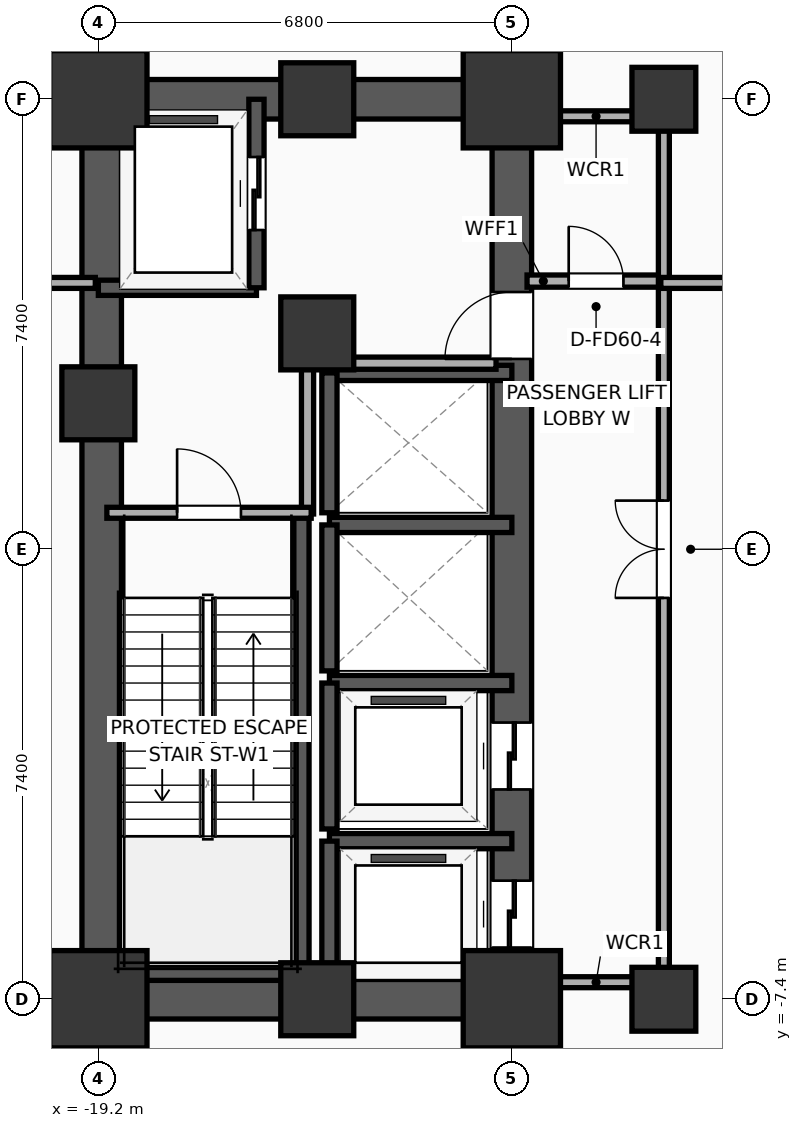
"""IFC4 building model, lengths in metres.
Left out: names, types, materials, properties, quantities, classifications, styles, units other than length and angle.
Written with IfcOpenShell. Run it as: python <this file> out.ifc"""

import sys

from ifc_helpers import new_model, si_unit, direction, frame, frame_2d, origin, origin_2d, place, context, subcontext, project, spatial, rectangle, extrude, element, fill, save


model = new_model("IFC4")
c1 = context("Model", 3, precision=1e-05, world=origin(), true_north=direction((0.0, 1.0)))
c2 = subcontext(c1, "Body", "Model", "MODEL_VIEW")
j1 = project(units=[si_unit("LENGTHUNIT", "METRE"), si_unit("PLANEANGLEUNIT", "RADIAN")], contexts=[c1])
p1 = place(None, origin())
s1 = spatial("IfcSite", under=j1, at=p1, CompositionType="ELEMENT")
p2 = place(p1, origin())
s2 = spatial("IfcBuilding", under=s1, at=p2, CompositionType="ELEMENT")
p3 = place(p2, frame((0.0, 0.0, 20.8)))
s3 = spatial("IfcBuildingStorey", under=s2, at=p3, CompositionType="ELEMENT", Elevation=20.8)
p4 = place(p3, frame((-19.2, -7.4, 0.0), z_axis=(0.0, 0.0, 1.0), x_axis=(1.0, 0.0, 0.0)))
e1 = element("IfcColumn", 1, at=p4, inside=s3, PredefinedType="COLUMN", context=c2, shape_type="SweptSolid", body=[
    extrude(rectangle(XDim=1.6, YDim=1.6, at=origin_2d()), origin(), (0.0, 0.0, 1.0), 5.2),
])
p5 = place(p3, frame((-19.2, 2.4, 0.0), z_axis=(0.0, 0.0, 1.0), x_axis=(1.0, 0.0, 0.0)))
e2 = element("IfcColumn", 2, at=p5, inside=s3, PredefinedType="COLUMN", context=c2, shape_type="SweptSolid", body=[
    extrude(rectangle(XDim=1.2, YDim=1.2, at=origin_2d()), origin(), (0.0, 0.0, 1.0), 5.2),
])
p6 = place(p3, frame((-19.2, 7.4, 0.0), z_axis=(0.0, 0.0, 1.0), x_axis=(1.0, 0.0, 0.0)))
e3 = element("IfcColumn", 3, at=p6, inside=s3, PredefinedType="COLUMN", context=c2, shape_type="SweptSolid", body=[
    extrude(rectangle(XDim=1.6, YDim=1.6, at=origin_2d()), origin(), (0.0, 0.0, 1.0), 5.2),
])
for number, where, z_axis, x_axis in (
    (4, (-15.6, -7.4, 0.0), (0.0, 0.0, 1.0), (1.0, 0.0, 0.0)),
    (5, (-15.6, 7.4, 0.0), (0.0, 0.0, 1.0), (1.0, 0.0, 0.0)),
):
    element("IfcColumn", number, at=place(p3, frame(where, z_axis=z_axis, x_axis=x_axis)), inside=s3, PredefinedType="COLUMN", context=c2, shape_type="SweptSolid", body=[
        extrude(rectangle(XDim=1.2, YDim=1.2, at=origin_2d()), origin(), (0.0, 0.0, 1.0), 5.2),
    ])
p7 = place(p3, frame((-12.4, -7.4, 0.0), z_axis=(0.0, 0.0, 1.0), x_axis=(1.0, 0.0, 0.0)))
e6 = element("IfcColumn", 6, at=p7, inside=s3, PredefinedType="COLUMN", context=c2, shape_type="SweptSolid", body=[
    extrude(rectangle(XDim=1.6, YDim=1.6, at=origin_2d()), origin(), (0.0, 0.0, 1.0), 5.2),
])
p8 = place(p3, frame((-15.6, 3.55, 0.0), z_axis=(0.0, 0.0, 1.0), x_axis=(1.0, 0.0, 0.0)))
e7 = element("IfcColumn", 7, at=p8, inside=s3, PredefinedType="COLUMN", context=c2, shape_type="SweptSolid", body=[
    extrude(rectangle(XDim=1.2, YDim=1.2, at=origin_2d()), origin(), (0.0, 0.0, 1.0), 5.2),
])
p9 = place(p3, frame((-12.4, 7.4, 0.0), z_axis=(0.0, 0.0, 1.0), x_axis=(1.0, 0.0, 0.0)))
e8 = element("IfcColumn", 8, at=p9, inside=s3, PredefinedType="COLUMN", context=c2, shape_type="SweptSolid", body=[
    extrude(rectangle(XDim=1.6, YDim=1.6, at=origin_2d()), origin(), (0.0, 0.0, 1.0), 5.2),
])
for number, where, z_axis, x_axis in (
    (9, (-19.525, -7.4, 0.0), (0.0, 0.0, 1.0), (1.0, 0.0, 0.0)),
    (10, (-19.525, 7.4, 0.0), (0.0, 0.0, 1.0), (1.0, 0.0, 0.0)),
):
    element("IfcWall", number, at=place(p3, frame(where, z_axis=z_axis, x_axis=x_axis)), inside=s3, PredefinedType="SHEAR", context=c2, shape_type="SweptSolid", body=[
        extrude(rectangle(XDim=7.45, YDim=0.65, at=frame_2d((3.725, 0.0))), origin(), (0.0, 0.0, 1.0), 4.95),
    ])
p10 = place(p3, frame((-19.145, -7.4, 0.0), z_axis=(0.0, 0.0, 1.0), x_axis=(0.0, 1.0, 0.0)))
e11 = element("IfcWall", 11, at=p10, inside=s3, PredefinedType="SHEAR", context=c2, shape_type="SweptSolid", body=[
    extrude(rectangle(XDim=14.8, YDim=0.65, at=frame_2d((7.4, 0.0))), origin(), (0.0, 0.0, 1.0), 4.95),
])
p11 = place(p3, frame((-12.4, -7.4, 0.0), z_axis=(0.0, 0.0, 1.0), x_axis=(0.0, 1.0, 0.0)))
e12 = element("IfcWall", 12, at=p11, inside=s3, PredefinedType="SHEAR", context=c2, shape_type="SweptSolid", body=[
    extrude(rectangle(XDim=14.8, YDim=0.65, at=frame_2d((7.4, 0.0))), origin(), (0.0, 0.0, 1.0), 4.95),
])
p12 = place(p11, frame((0.85, 0.0, 0.0)))
e13 = element("IfcOpeningElement", 13, at=p12, cuts=e12, PredefinedType="OPENING", context=c2, shape_type="SweptSolid", body=[
    extrude(rectangle(XDim=1.1, YDim=2.05, at=frame_2d((0.55, 1.025))), frame((0.0, 0.335, 0.0), z_axis=(0.0, -1.0, 0.0), x_axis=(1.0, 0.0, 0.0)), (0.0, 0.0, 1.0), 0.67),
])
p13 = place(p11, frame((3.45, 0.0, 0.0)))
e14 = element("IfcOpeningElement", 14, at=p13, cuts=e12, PredefinedType="OPENING", context=c2, shape_type="SweptSolid", body=[
    extrude(rectangle(XDim=1.1, YDim=2.05, at=frame_2d((0.55, 1.025))), frame((0.0, 0.335, 0.0), z_axis=(0.0, -1.0, 0.0), x_axis=(1.0, 0.0, 0.0)), (0.0, 0.0, 1.0), 0.67),
])
p14 = place(p11, frame((10.53, 0.0, 0.0)))
e15 = element("IfcOpeningElement", 15, at=p14, cuts=e12, PredefinedType="OPENING", context=c2, shape_type="SweptSolid", body=[
    extrude(rectangle(XDim=1.1, YDim=2.05, at=frame_2d((0.55, 1.025))), frame((0.0, 0.335, 0.0), z_axis=(0.0, -1.0, 0.0), x_axis=(1.0, 0.0, 0.0)), (0.0, 0.0, 1.0), 0.67),
])
p15 = place(p3, frame((-15.86, -7.085, 0.0), z_axis=(0.0, 0.0, 1.0), x_axis=(0.0, 1.0, 0.0)))
e16 = element("IfcWall", 16, at=p15, inside=s3, PredefinedType="SOLIDWALL", context=c2, shape_type="SweptSolid", body=[
    extrude(rectangle(XDim=7.685, YDim=0.25, at=frame_2d((3.843, 0.0))), origin(), (0.0, 0.0, 1.0), 4.95),
])
p16 = place(p3, frame((-19.2, -6.965, 0.0), z_axis=(0.0, 0.0, 1.0), x_axis=(1.0, 0.0, 0.0)))
e17 = element("IfcWall", 17, at=p16, inside=s3, PredefinedType="SOLIDWALL", context=c2, shape_type="SweptSolid", body=[
    extrude(rectangle(XDim=3.46, YDim=0.25, at=frame_2d((1.73, 0.0))), origin(), (0.0, 0.0, 1.0), 4.95),
])
for number, where, z_axis, x_axis in (
    (18, (-9.9, -7.4, 0.0), (0.0, 0.0, 1.0), (1.0, 0.0, 0.0)),
    (19, (-9.9, 7.4, 0.0), (0.0, 0.0, 1.0), (1.0, 0.0, 0.0)),
):
    element("IfcColumn", number, at=place(p3, frame(where, z_axis=z_axis, x_axis=x_axis)), inside=s3, PredefinedType="COLUMN", context=c2, shape_type="SweptSolid", body=[
        extrude(rectangle(XDim=1.05, YDim=1.05, at=origin_2d()), origin(), (0.0, 0.0, 1.0), 5.2),
    ])
p17 = place(p3, frame((-19.2, 4.3, 0.0), z_axis=(0.0, 0.0, 1.0), x_axis=(1.0, 0.0, 0.0)))
e20 = element("IfcWall", 20, at=p17, inside=s3, PredefinedType="SOLIDWALL", context=c2, shape_type="SweptSolid", body=[
    extrude(rectangle(XDim=2.6, YDim=0.25, at=frame_2d((1.3, 0.0))), origin(), (0.0, 0.0, 1.0), 4.95),
])
p18 = place(p3, frame((-16.6, 4.3, 0.0), z_axis=(0.0, 0.0, 1.0), x_axis=(0.0, 1.0, 0.0)))
e21 = element("IfcWall", 21, at=p18, inside=s3, PredefinedType="SOLIDWALL", context=c2, shape_type="SweptSolid", body=[
    extrude(rectangle(XDim=3.1, YDim=0.25, at=frame_2d((1.55, 0.0))), origin(), (0.0, 0.0, 1.0), 4.95),
])
p19 = place(p18, frame((0.95, 0.0, 0.0)))
e22 = element("IfcOpeningElement", 22, at=p19, cuts=e21, PredefinedType="OPENING", context=c2, shape_type="SweptSolid", body=[
    extrude(rectangle(XDim=1.2, YDim=2.05, at=frame_2d((0.6, 1.025))), frame((0.0, 0.135, 0.0), z_axis=(0.0, -1.0, 0.0), x_axis=(1.0, 0.0, 0.0)), (0.0, 0.0, 1.0), 0.27),
])
p20 = place(p3, frame((-12.4, -4.8, 0.0), z_axis=(0.0, 0.0, 1.0), x_axis=(-1.0, 0.0, 0.0)))
e23 = element("IfcWall", 23, at=p20, inside=s3, PredefinedType="SOLIDWALL", context=c2, shape_type="SweptSolid", body=[
    extrude(rectangle(XDim=3.0, YDim=0.25, at=frame_2d((1.5, 0.0))), origin(), (0.0, 0.0, 1.0), 4.95),
])
p21 = place(p3, frame((-15.4, -4.8, 0.0), z_axis=(0.0, 0.0, 1.0), x_axis=(0.0, -1.0, 0.0)))
e24 = element("IfcWall", 24, at=p21, inside=s3, PredefinedType="SOLIDWALL", context=c2, shape_type="SweptSolid", body=[
    extrude(rectangle(XDim=2.6, YDim=0.25, at=frame_2d((1.3, 0.0))), origin(), (0.0, 0.0, 1.0), 4.95),
])
p22 = place(p3, frame((-12.4, -2.2, 0.0), z_axis=(0.0, 0.0, 1.0), x_axis=(-1.0, 0.0, 0.0)))
e25 = element("IfcWall", 25, at=p22, inside=s3, PredefinedType="SOLIDWALL", context=c2, shape_type="SweptSolid", body=[
    extrude(rectangle(XDim=3.0, YDim=0.25, at=frame_2d((1.5, 0.0))), origin(), (0.0, 0.0, 1.0), 4.95),
])
p23 = place(p3, frame((-15.4, -2.2, 0.0), z_axis=(0.0, 0.0, 1.0), x_axis=(0.0, -1.0, 0.0)))
e26 = element("IfcWall", 26, at=p23, inside=s3, PredefinedType="SOLIDWALL", context=c2, shape_type="SweptSolid", body=[
    extrude(rectangle(XDim=2.4, YDim=0.25, at=frame_2d((1.2, 0.0))), origin(), (0.0, 0.0, 1.0), 4.95),
])
p24 = place(p3, frame((-12.4, 0.4, 0.0), z_axis=(0.0, 0.0, 1.0), x_axis=(-1.0, 0.0, 0.0)))
e27 = element("IfcWall", 27, at=p24, inside=s3, PredefinedType="SOLIDWALL", context=c2, shape_type="SweptSolid", body=[
    extrude(rectangle(XDim=3.0, YDim=0.25, at=frame_2d((1.5, 0.0))), origin(), (0.0, 0.0, 1.0), 4.95),
])
p25 = place(p3, frame((-15.4, 0.4, 0.0), z_axis=(0.0, 0.0, 1.0), x_axis=(0.0, -1.0, 0.0)))
e28 = element("IfcWall", 28, at=p25, inside=s3, PredefinedType="SOLIDWALL", context=c2, shape_type="SweptSolid", body=[
    extrude(rectangle(XDim=2.4, YDim=0.25, at=frame_2d((1.2, 0.0))), origin(), (0.0, 0.0, 1.0), 4.95),
])
p26 = place(p3, frame((-12.4, 2.9, 0.0), z_axis=(0.0, 0.0, 1.0), x_axis=(-1.0, 0.0, 0.0)))
e29 = element("IfcWall", 29, at=p26, inside=s3, PredefinedType="SOLIDWALL", context=c2, shape_type="SweptSolid", body=[
    extrude(rectangle(XDim=3.0, YDim=0.25, at=frame_2d((1.5, 0.0))), origin(), (0.0, 0.0, 1.0), 4.95),
])
p27 = place(p3, frame((-15.4, 2.9, 0.0), z_axis=(0.0, 0.0, 1.0), x_axis=(0.0, -1.0, 0.0)))
e30 = element("IfcWall", 30, at=p27, inside=s3, PredefinedType="SOLIDWALL", context=c2, shape_type="SweptSolid", body=[
    extrude(rectangle(XDim=2.3, YDim=0.25, at=frame_2d((1.15, 0.0))), origin(), (0.0, 0.0, 1.0), 4.95),
])
p28 = place(p3, frame((-15.76, 0.58, 0.0), z_axis=(0.0, 0.0, 1.0), x_axis=(0.0, 1.0, 0.0)))
e31 = element("IfcWall", 31, at=p28, inside=s3, PredefinedType="PARTITIONING", context=c2, shape_type="SweptSolid", body=[
    extrude(rectangle(XDim=2.52, YDim=0.2, at=frame_2d((1.26, 0.0))), origin(), (0.0, 0.0, 1.0), 4.95),
])
p29 = place(p3, frame((-15.82, 3.06, 0.0), z_axis=(0.0, 0.0, 1.0), x_axis=(1.0, 0.0, 0.0)))
e32 = element("IfcWall", 32, at=p29, inside=s3, PredefinedType="PARTITIONING", context=c2, shape_type="SweptSolid", body=[
    extrude(rectangle(XDim=3.16, YDim=0.2, at=frame_2d((1.58, 0.0))), origin(), (0.0, 0.0, 1.0), 4.95),
])
p30 = place(p3, frame((-19.06, 0.6, 0.0), z_axis=(0.0, 0.0, 1.0), x_axis=(1.0, 0.0, 0.0)))
e33 = element("IfcWall", 33, at=p30, inside=s3, PredefinedType="PARTITIONING", context=c2, shape_type="SweptSolid", body=[
    extrude(rectangle(XDim=3.36, YDim=0.18, at=frame_2d((1.68, 0.0))), origin(), (0.0, 0.0, 1.0), 4.95),
])
p31 = place(p30, frame((1.155, 0.0, 0.0)))
e34 = element("IfcOpeningElement", 34, at=p31, cuts=e33, PredefinedType="OPENING", context=c2, shape_type="SweptSolid", body=[
    extrude(rectangle(XDim=1.05, YDim=2.05, at=frame_2d((0.525, 1.025))), frame((0.0, 0.1, 0.0), z_axis=(0.0, -1.0, 0.0), x_axis=(1.0, 0.0, 0.0)), (0.0, 0.0, 1.0), 0.2),
])
p32 = place(p3, frame((-12.15, 4.41, 0.0), z_axis=(0.0, 0.0, 1.0), x_axis=(1.0, 0.0, 0.0)))
e35 = element("IfcWall", 35, at=p32, inside=s3, PredefinedType="PARTITIONING", context=c2, shape_type="SweptSolid", body=[
    extrude(rectangle(XDim=2.27, YDim=0.2, at=frame_2d((1.135, 0.0))), origin(), (0.0, 0.0, 1.0), 4.95),
])
p33 = place(p32, frame((0.685, 0.0, 0.0)))
e36 = element("IfcOpeningElement", 36, at=p33, cuts=e35, PredefinedType="OPENING", context=c2, shape_type="SweptSolid", body=[
    extrude(rectangle(XDim=0.9, YDim=2.05, at=frame_2d((0.45, 1.025))), frame((0.0, 0.11, 0.0), z_axis=(0.0, -1.0, 0.0), x_axis=(1.0, 0.0, 0.0)), (0.0, 0.0, 1.0), 0.22),
])
for number, where, z_axis, x_axis in (
    (37, (-12.15, 7.12, 0.0), (0.0, 0.0, 1.0), (1.0, 0.0, 0.0)),
    (38, (-12.15, -7.12, 0.0), (0.0, 0.0, 1.0), (1.0, 0.0, 0.0)),
):
    element("IfcWall", number, at=place(p3, frame(where, z_axis=z_axis, x_axis=x_axis)), inside=s3, PredefinedType="PARTITIONING", context=c2, shape_type="SweptSolid", body=[
        extrude(rectangle(XDim=2.27, YDim=0.18, at=frame_2d((1.135, 0.0))), origin(), (0.0, 0.0, 1.0), 4.95),
    ])
p34 = place(p3, frame((-9.9, -7.12, 0.0), z_axis=(0.0, 0.0, 1.0), x_axis=(0.0, 1.0, 0.0)))
e39 = element("IfcWall", 39, at=p34, inside=s3, PredefinedType="PARTITIONING", context=c2, shape_type="SweptSolid", body=[
    extrude(rectangle(XDim=14.24, YDim=0.18, at=frame_2d((7.12, 0.0))), origin(), (0.0, 0.0, 1.0), 4.95),
])
p35 = place(p34, frame((6.32, 0.0, 0.0)))
e40 = element("IfcOpeningElement", 40, at=p35, cuts=e39, PredefinedType="OPENING", context=c2, shape_type="SweptSolid", body=[
    extrude(rectangle(XDim=1.6, YDim=2.05, at=frame_2d((0.8, 1.025))), frame((0.0, 0.1, 0.0), z_axis=(0.0, -1.0, 0.0), x_axis=(1.0, 0.0, 0.0)), (0.0, 0.0, 1.0), 0.2),
])
p36 = place(p3, frame((-38.0, 4.38, 0.0), z_axis=(0.0, 0.0, 1.0), x_axis=(1.0, 0.0, 0.0)))
e41 = element("IfcWall", 41, at=p36, inside=s3, PredefinedType="PARTITIONING", context=c2, shape_type="SweptSolid", body=[
    extrude(rectangle(XDim=18.75, YDim=0.18, at=frame_2d((9.375, 0.0))), origin(), (0.0, 0.0, 1.0), 4.95),
])
p37 = place(p36, frame((11.712, 0.0, 0.0)))
e42 = element("IfcOpeningElement", 42, at=p37, cuts=e41, PredefinedType="OPENING", context=c2, shape_type="SweptSolid", body=[
    extrude(rectangle(XDim=0.95, YDim=2.05, at=frame_2d((0.475, 1.025))), frame((0.0, 0.1, 0.0), z_axis=(0.0, -1.0, 0.0), x_axis=(1.0, 0.0, 0.0)), (0.0, 0.0, 1.0), 0.2),
])
p38 = place(p3, frame((-9.95, 4.38, 0.0), z_axis=(0.0, 0.0, 1.0), x_axis=(1.0, 0.0, 0.0)))
e43 = element("IfcWall", 43, at=p38, inside=s3, PredefinedType="PARTITIONING", context=c2, shape_type="SweptSolid", body=[
    extrude(rectangle(XDim=19.9, YDim=0.18, at=frame_2d((9.95, 0.0))), origin(), (0.0, 0.0, 1.0), 4.95),
])
p39 = place(p38, frame((9.15, 0.0, 0.0)))
e44 = element("IfcOpeningElement", 44, at=p39, cuts=e43, PredefinedType="OPENING", context=c2, shape_type="SweptSolid", body=[
    extrude(rectangle(XDim=1.6, YDim=2.05, at=frame_2d((0.8, 1.025))), frame((0.0, 0.1, 0.0), z_axis=(0.0, -1.0, 0.0), x_axis=(1.0, 0.0, 0.0)), (0.0, 0.0, 1.0), 0.2),
])
p40 = place(p19, origin())
e45 = element("IfcDoor", 45, at=p40, inside=s3, OperationType="SLIDING_TO_LEFT", PredefinedType="DOOR", context=c2, shape_type="SweptSolid", body=[
    extrude(rectangle(XDim=1.2, YDim=2.05, at=frame_2d((0.6, 1.025))), frame((0.0, 0.025, 0.0), z_axis=(0.0, -1.0, 0.0), x_axis=(1.0, 0.0, 0.0)), (0.0, 0.0, 1.0), 0.05),
])
fill(e22, e45)
p41 = place(p12, origin())
e46 = element("IfcDoor", 46, at=p41, inside=s3, OperationType="SLIDING_TO_LEFT", PredefinedType="DOOR", context=c2, shape_type="SweptSolid", body=[
    extrude(rectangle(XDim=1.1, YDim=2.05, at=frame_2d((0.55, 1.025))), frame((0.0, 0.025, 0.0), z_axis=(0.0, -1.0, 0.0), x_axis=(1.0, 0.0, 0.0)), (0.0, 0.0, 1.0), 0.05),
])
fill(e13, e46)
p42 = place(p13, origin())
e47 = element("IfcDoor", 47, at=p42, inside=s3, OperationType="SLIDING_TO_LEFT", PredefinedType="DOOR", context=c2, shape_type="SweptSolid", body=[
    extrude(rectangle(XDim=1.1, YDim=2.05, at=frame_2d((0.55, 1.025))), frame((0.0, 0.025, 0.0), z_axis=(0.0, -1.0, 0.0), x_axis=(1.0, 0.0, 0.0)), (0.0, 0.0, 1.0), 0.05),
])
fill(e14, e47)
p43 = place(p31, origin())
e48 = element("IfcDoor", 48, at=p43, inside=s3, OperationType="SINGLE_SWING_LEFT", PredefinedType="DOOR", context=c2, shape_type="SweptSolid", body=[
    extrude(rectangle(XDim=1.05, YDim=2.05, at=frame_2d((0.525, 1.025))), frame((0.0, 0.025, 0.0), z_axis=(0.0, -1.0, 0.0), x_axis=(1.0, 0.0, 0.0)), (0.0, 0.0, 1.0), 0.05),
])
fill(e34, e48)
p44 = place(p33, origin())
e49 = element("IfcDoor", 49, at=p44, inside=s3, OperationType="SINGLE_SWING_LEFT", PredefinedType="DOOR", context=c2, shape_type="SweptSolid", body=[
    extrude(rectangle(XDim=0.9, YDim=2.05, at=frame_2d((0.45, 1.025))), frame((0.0, 0.025, 0.0), z_axis=(0.0, -1.0, 0.0), x_axis=(1.0, 0.0, 0.0)), (0.0, 0.0, 1.0), 0.05),
])
fill(e36, e49)
p45 = place(p35, origin())
e50 = element("IfcDoor", 50, at=p45, inside=s3, OperationType="DOUBLE_DOOR_SINGLE_SWING", PredefinedType="DOOR", context=c2, shape_type="SweptSolid", body=[
    extrude(rectangle(XDim=1.6, YDim=2.05, at=frame_2d((0.8, 1.025))), frame((0.0, 0.025, 0.0), z_axis=(0.0, -1.0, 0.0), x_axis=(1.0, 0.0, 0.0)), (0.0, 0.0, 1.0), 0.05),
])
fill(e40, e50)
p46 = place(p14, origin())
e51 = element("IfcDoor", 51, at=p46, inside=s3, OperationType="SINGLE_SWING_LEFT", PredefinedType="DOOR", context=c2, shape_type="SweptSolid", body=[
    extrude(rectangle(XDim=1.1, YDim=2.05, at=frame_2d((0.55, 1.025))), frame((0.0, 0.025, 0.0), z_axis=(0.0, -1.0, 0.0), x_axis=(1.0, 0.0, 0.0)), (0.0, 0.0, 1.0), 0.05),
])
fill(e15, e51)
save(model, sys.argv[1])
